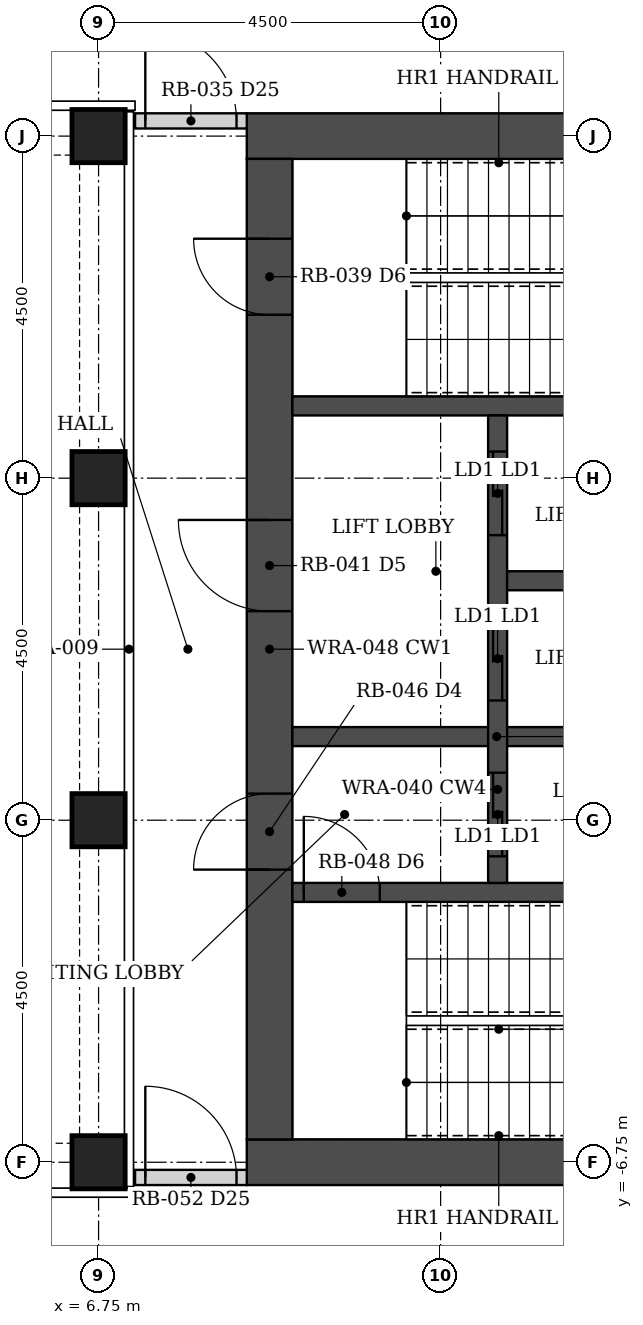
"""IFC4 building model, lengths in metres.
Left out: names, types, materials, properties, quantities, classifications, styles, units other than length and angle.
Written with IfcOpenShell. Run it as: python <this file> out.ifc"""

import sys

from ifc_helpers import new_model, si_unit, direction, frame, frame_2d, origin, origin_2d, place, context, subcontext, project, spatial, rectangle, hollow_rectangle, extrude, element, fill, save


model = new_model("IFC4")
c1 = context("Model", 3, precision=1e-05, world=origin(), true_north=direction((0.0, 1.0)))
c2 = subcontext(c1, "Body", "Model", "MODEL_VIEW")
j1 = project(units=[si_unit("LENGTHUNIT", "METRE"), si_unit("PLANEANGLEUNIT", "RADIAN")], contexts=[c1])
p1 = place(None, origin())
s1 = spatial("IfcSite", under=j1, at=p1, CompositionType="ELEMENT")
p2 = place(p1, origin())
s2 = spatial("IfcBuilding", under=s1, at=p2, CompositionType="ELEMENT")
p3 = place(p2, frame((0.0, 0.0, 37.0)))
s3 = spatial("IfcBuildingStorey", under=s2, at=p3, CompositionType="ELEMENT", Elevation=37.0)
for number, where, z_axis, x_axis in (
    (1, (6.75, -6.75, 0.0), (0.0, 0.0, 1.0), (1.0, 0.0, 0.0)),
    (2, (6.75, -2.25, 0.0), (0.0, 0.0, 1.0), (1.0, 0.0, 0.0)),
    (3, (6.75, 2.25, 0.0), (0.0, 0.0, 1.0), (1.0, 0.0, 0.0)),
    (4, (6.75, 6.75, 0.0), (0.0, 0.0, 1.0), (1.0, 0.0, 0.0)),
):
    element("IfcColumn", number, at=place(p3, frame(where, z_axis=z_axis, x_axis=x_axis)), inside=s3, PredefinedType="COLUMN", context=c2, shape_type="SweptSolid", body=[
        extrude(hollow_rectangle(XDim=0.7, YDim=0.7, WallThickness=0.07, at=origin_2d()), origin(), (0.0, 0.0, 1.0), 3.5),
    ])
for number, where, z_axis, x_axis in (
    (5, (8.7, -6.75, 0.0), (0.0, 0.0, 1.0), (1.0, 0.0, 0.0)),
    (6, (8.7, 6.75, 0.0), (0.0, 0.0, 1.0), (1.0, 0.0, 0.0)),
):
    element("IfcWall", number, at=place(p3, frame(where, z_axis=z_axis, x_axis=x_axis)), inside=s3, PredefinedType="SHEAR", context=c2, shape_type="SweptSolid", body=[
        extrude(rectangle(XDim=9.6, YDim=0.6, at=frame_2d((4.8, 0.0))), origin(), (0.0, 0.0, 1.0), 3.5),
    ])
p4 = place(p3, frame((9.0, -6.45, 0.0), z_axis=(0.0, 0.0, 1.0), x_axis=(0.0, 1.0, 0.0)))
e7 = element("IfcWall", 7, at=p4, inside=s3, PredefinedType="SHEAR", context=c2, shape_type="SweptSolid", body=[
    extrude(rectangle(XDim=12.9, YDim=0.6, at=frame_2d((6.45, 0.0))), origin(), (0.0, 0.0, 1.0), 3.5),
])
p5 = place(p4, frame((3.55, 0.0, 0.0)))
e8 = element("IfcOpeningElement", 8, at=p5, cuts=e7, PredefinedType="OPENING", context=c2, shape_type="SweptSolid", body=[
    extrude(rectangle(XDim=1.0, YDim=2.1, at=frame_2d((0.5, 1.05))), frame((0.0, 0.31, 0.0), z_axis=(0.0, -1.0, 0.0), x_axis=(1.0, 0.0, 0.0)), (0.0, 0.0, 1.0), 0.62),
])
p6 = place(p4, frame((6.95, 0.0, 0.0)))
e9 = element("IfcOpeningElement", 9, at=p6, cuts=e7, PredefinedType="OPENING", context=c2, shape_type="SweptSolid", body=[
    extrude(rectangle(XDim=1.2, YDim=2.1, at=frame_2d((0.6, 1.05))), frame((0.0, 0.31, 0.0), z_axis=(0.0, -1.0, 0.0), x_axis=(1.0, 0.0, 0.0)), (0.0, 0.0, 1.0), 0.62),
])
p7 = place(p4, frame((10.85, 0.0, 0.0)))
e10 = element("IfcOpeningElement", 10, at=p7, cuts=e7, PredefinedType="OPENING", context=c2, shape_type="SweptSolid", body=[
    extrude(rectangle(XDim=1.0, YDim=2.1, at=frame_2d((0.5, 1.05))), frame((0.0, 0.31, 0.0), z_axis=(0.0, -1.0, 0.0), x_axis=(1.0, 0.0, 0.0)), (0.0, 0.0, 1.0), 0.62),
])
p8 = place(p3, frame((9.3, -3.2, 0.0), z_axis=(0.0, 0.0, 1.0), x_axis=(1.0, 0.0, 0.0)))
e11 = element("IfcWall", 11, at=p8, inside=s3, PredefinedType="SHEAR", context=c2, shape_type="SweptSolid", body=[
    extrude(rectangle(XDim=8.4, YDim=0.25, at=frame_2d((4.2, 0.0))), origin(), (0.0, 0.0, 1.0), 3.5),
])
p9 = place(p8, frame((0.15, 0.0, 0.0)))
e12 = element("IfcOpeningElement", 12, at=p9, cuts=e11, PredefinedType="OPENING", context=c2, shape_type="SweptSolid", body=[
    extrude(rectangle(XDim=1.0, YDim=2.1, at=frame_2d((0.5, 1.05))), frame((0.0, 0.135, 0.0), z_axis=(0.0, -1.0, 0.0), x_axis=(1.0, 0.0, 0.0)), (0.0, 0.0, 1.0), 0.27),
])
p10 = place(p3, frame((9.3, 3.2, 0.0), z_axis=(0.0, 0.0, 1.0), x_axis=(1.0, 0.0, 0.0)))
e13 = element("IfcWall", 13, at=p10, inside=s3, PredefinedType="SHEAR", context=c2, shape_type="SweptSolid", body=[
    extrude(rectangle(XDim=8.4, YDim=0.25, at=frame_2d((4.2, 0.0))), origin(), (0.0, 0.0, 1.0), 3.5),
])
p11 = place(p3, frame((9.3, -1.15, 0.0), z_axis=(0.0, 0.0, 1.0), x_axis=(1.0, 0.0, 0.0)))
e14 = element("IfcWall", 14, at=p11, inside=s3, PredefinedType="SHEAR", context=c2, shape_type="SweptSolid", body=[
    extrude(rectangle(XDim=5.375, YDim=0.25, at=frame_2d((2.688, 0.0))), origin(), (0.0, 0.0, 1.0), 3.5),
])
p12 = place(p3, frame((12.0, -3.075, 0.0), z_axis=(0.0, 0.0, 1.0), x_axis=(0.0, 1.0, 0.0)))
e15 = element("IfcWall", 15, at=p12, inside=s3, PredefinedType="SHEAR", context=c2, shape_type="SweptSolid", body=[
    extrude(rectangle(XDim=6.15, YDim=0.25, at=frame_2d((3.075, 0.0))), origin(), (0.0, 0.0, 1.0), 3.5),
])
p13 = place(p12, frame((0.35, 0.0, 0.0)))
e16 = element("IfcOpeningElement", 16, at=p13, cuts=e15, PredefinedType="OPENING", context=c2, shape_type="SweptSolid", body=[
    extrude(rectangle(XDim=1.1, YDim=2.1, at=frame_2d((0.55, 1.05))), frame((0.0, 0.135, 0.0), z_axis=(0.0, -1.0, 0.0), x_axis=(1.0, 0.0, 0.0)), (0.0, 0.0, 1.0), 0.27),
])
p14 = place(p12, frame((2.4, 0.0, 0.0)))
e17 = element("IfcOpeningElement", 17, at=p14, cuts=e15, PredefinedType="OPENING", context=c2, shape_type="SweptSolid", body=[
    extrude(rectangle(XDim=1.1, YDim=2.1, at=frame_2d((0.55, 1.05))), frame((0.0, 0.135, 0.0), z_axis=(0.0, -1.0, 0.0), x_axis=(1.0, 0.0, 0.0)), (0.0, 0.0, 1.0), 0.27),
])
p15 = place(p12, frame((4.575, 0.0, 0.0)))
e18 = element("IfcOpeningElement", 18, at=p15, cuts=e15, PredefinedType="OPENING", context=c2, shape_type="SweptSolid", body=[
    extrude(rectangle(XDim=1.1, YDim=2.1, at=frame_2d((0.55, 1.05))), frame((0.0, 0.135, 0.0), z_axis=(0.0, -1.0, 0.0), x_axis=(1.0, 0.0, 0.0)), (0.0, 0.0, 1.0), 0.27),
])
p16 = place(p3, frame((12.125, 0.9, 0.0), z_axis=(0.0, 0.0, 1.0), x_axis=(1.0, 0.0, 0.0)))
e19 = element("IfcWall", 19, at=p16, inside=s3, PredefinedType="SHEAR", context=c2, shape_type="SweptSolid", body=[
    extrude(rectangle(XDim=2.55, YDim=0.25, at=frame_2d((1.275, 0.0))), origin(), (0.0, 0.0, 1.0), 3.5),
])
p17 = place(p3, frame((7.23, 6.95, 0.0), z_axis=(0.0, 0.0, 1.0), x_axis=(1.0, 0.0, 0.0)))
e20 = element("IfcWall", 20, at=p17, inside=s3, PredefinedType="PARTITIONING", context=c2, shape_type="SweptSolid", body=[
    extrude(rectangle(XDim=1.47, YDim=0.2, at=frame_2d((0.735, 0.0))), origin(), (0.0, 0.0, 1.0), 2.373),
])
p18 = place(p17, frame((0.135, 0.0, 0.0)))
e21 = element("IfcOpeningElement", 21, at=p18, cuts=e20, PredefinedType="OPENING", context=c2, shape_type="SweptSolid", body=[
    extrude(rectangle(XDim=1.2, YDim=2.1, at=frame_2d((0.6, 1.05))), frame((0.0, 0.11, 0.0), z_axis=(0.0, -1.0, 0.0), x_axis=(1.0, 0.0, 0.0)), (0.0, 0.0, 1.0), 0.22),
])
p19 = place(p3, frame((7.23, -6.95, 0.0), z_axis=(0.0, 0.0, 1.0), x_axis=(1.0, 0.0, 0.0)))
e22 = element("IfcWall", 22, at=p19, inside=s3, PredefinedType="PARTITIONING", context=c2, shape_type="SweptSolid", body=[
    extrude(rectangle(XDim=1.47, YDim=0.2, at=frame_2d((0.735, 0.0))), origin(), (0.0, 0.0, 1.0), 2.373),
])
p20 = place(p19, frame((0.135, 0.0, 0.0)))
e23 = element("IfcOpeningElement", 23, at=p20, cuts=e22, PredefinedType="OPENING", context=c2, shape_type="SweptSolid", body=[
    extrude(rectangle(XDim=1.2, YDim=2.1, at=frame_2d((0.6, 1.05))), frame((0.0, 0.11, 0.0), z_axis=(0.0, -1.0, 0.0), x_axis=(1.0, 0.0, 0.0)), (0.0, 0.0, 1.0), 0.22),
])
p21 = place(p18, origin())
e24 = element("IfcDoor", 24, at=p21, inside=s3, OperationType="DOUBLE_DOOR_DOUBLE_SWING", PredefinedType="DOOR", context=c2, shape_type="SweptSolid", body=[
    extrude(rectangle(XDim=1.2, YDim=2.1, at=frame_2d((0.6, 1.05))), frame((0.0, 0.025, 0.0), z_axis=(0.0, -1.0, 0.0), x_axis=(1.0, 0.0, 0.0)), (0.0, 0.0, 1.0), 0.05),
])
fill(e21, e24)
p22 = place(p20, origin())
e25 = element("IfcDoor", 25, at=p22, inside=s3, OperationType="DOUBLE_DOOR_DOUBLE_SWING", PredefinedType="DOOR", context=c2, shape_type="SweptSolid", body=[
    extrude(rectangle(XDim=1.2, YDim=2.1, at=frame_2d((0.6, 1.05))), frame((0.0, 0.025, 0.0), z_axis=(0.0, -1.0, 0.0), x_axis=(1.0, 0.0, 0.0)), (0.0, 0.0, 1.0), 0.05),
])
fill(e23, e25)
p23 = place(p5, origin())
e26 = element("IfcDoor", 26, at=p23, inside=s3, OperationType="SINGLE_SWING_LEFT", PredefinedType="DOOR", context=c2, shape_type="SweptSolid", body=[
    extrude(rectangle(XDim=1.0, YDim=2.1, at=frame_2d((0.5, 1.05))), frame((0.0, 0.025, 0.0), z_axis=(0.0, -1.0, 0.0), x_axis=(1.0, 0.0, 0.0)), (0.0, 0.0, 1.0), 0.05),
])
fill(e8, e26)
p24 = place(p9, origin())
e27 = element("IfcDoor", 27, at=p24, inside=s3, OperationType="SINGLE_SWING_LEFT", PredefinedType="DOOR", context=c2, shape_type="SweptSolid", body=[
    extrude(rectangle(XDim=1.0, YDim=2.1, at=frame_2d((0.5, 1.05))), frame((0.0, 0.025, 0.0), z_axis=(0.0, -1.0, 0.0), x_axis=(1.0, 0.0, 0.0)), (0.0, 0.0, 1.0), 0.05),
])
fill(e12, e27)
p25 = place(p6, origin())
e28 = element("IfcDoor", 28, at=p25, inside=s3, OperationType="SINGLE_SWING_RIGHT", PredefinedType="DOOR", context=c2, shape_type="SweptSolid", body=[
    extrude(rectangle(XDim=1.2, YDim=2.1, at=frame_2d((0.6, 1.05))), frame((0.0, 0.025, 0.0), z_axis=(0.0, -1.0, 0.0), x_axis=(1.0, 0.0, 0.0)), (0.0, 0.0, 1.0), 0.05),
])
fill(e9, e28)
p26 = place(p7, origin())
e29 = element("IfcDoor", 29, at=p26, inside=s3, OperationType="SINGLE_SWING_RIGHT", PredefinedType="DOOR", context=c2, shape_type="SweptSolid", body=[
    extrude(rectangle(XDim=1.0, YDim=2.1, at=frame_2d((0.5, 1.05))), frame((0.0, 0.025, 0.0), z_axis=(0.0, -1.0, 0.0), x_axis=(1.0, 0.0, 0.0)), (0.0, 0.0, 1.0), 0.05),
])
fill(e10, e29)
p27 = place(p13, origin())
e30 = element("IfcDoor", 30, at=p27, inside=s3, OperationType="DOUBLE_DOOR_SLIDING", PredefinedType="DOOR", context=c2, shape_type="SweptSolid", body=[
    extrude(rectangle(XDim=1.1, YDim=2.1, at=frame_2d((0.55, 1.05))), frame((0.0, 0.025, 0.0), z_axis=(0.0, -1.0, 0.0), x_axis=(1.0, 0.0, 0.0)), (0.0, 0.0, 1.0), 0.05),
])
fill(e16, e30)
p28 = place(p14, origin())
e31 = element("IfcDoor", 31, at=p28, inside=s3, OperationType="DOUBLE_DOOR_SLIDING", PredefinedType="DOOR", context=c2, shape_type="SweptSolid", body=[
    extrude(rectangle(XDim=1.1, YDim=2.1, at=frame_2d((0.55, 1.05))), frame((0.0, 0.025, 0.0), z_axis=(0.0, -1.0, 0.0), x_axis=(1.0, 0.0, 0.0)), (0.0, 0.0, 1.0), 0.05),
])
fill(e17, e31)
p29 = place(p15, origin())
e32 = element("IfcDoor", 32, at=p29, inside=s3, OperationType="DOUBLE_DOOR_SLIDING", PredefinedType="DOOR", context=c2, shape_type="SweptSolid", body=[
    extrude(rectangle(XDim=1.1, YDim=2.1, at=frame_2d((0.55, 1.05))), frame((0.0, 0.025, 0.0), z_axis=(0.0, -1.0, 0.0), x_axis=(1.0, 0.0, 0.0)), (0.0, 0.0, 1.0), 0.05),
])
fill(e18, e32)
save(model, sys.argv[1])
